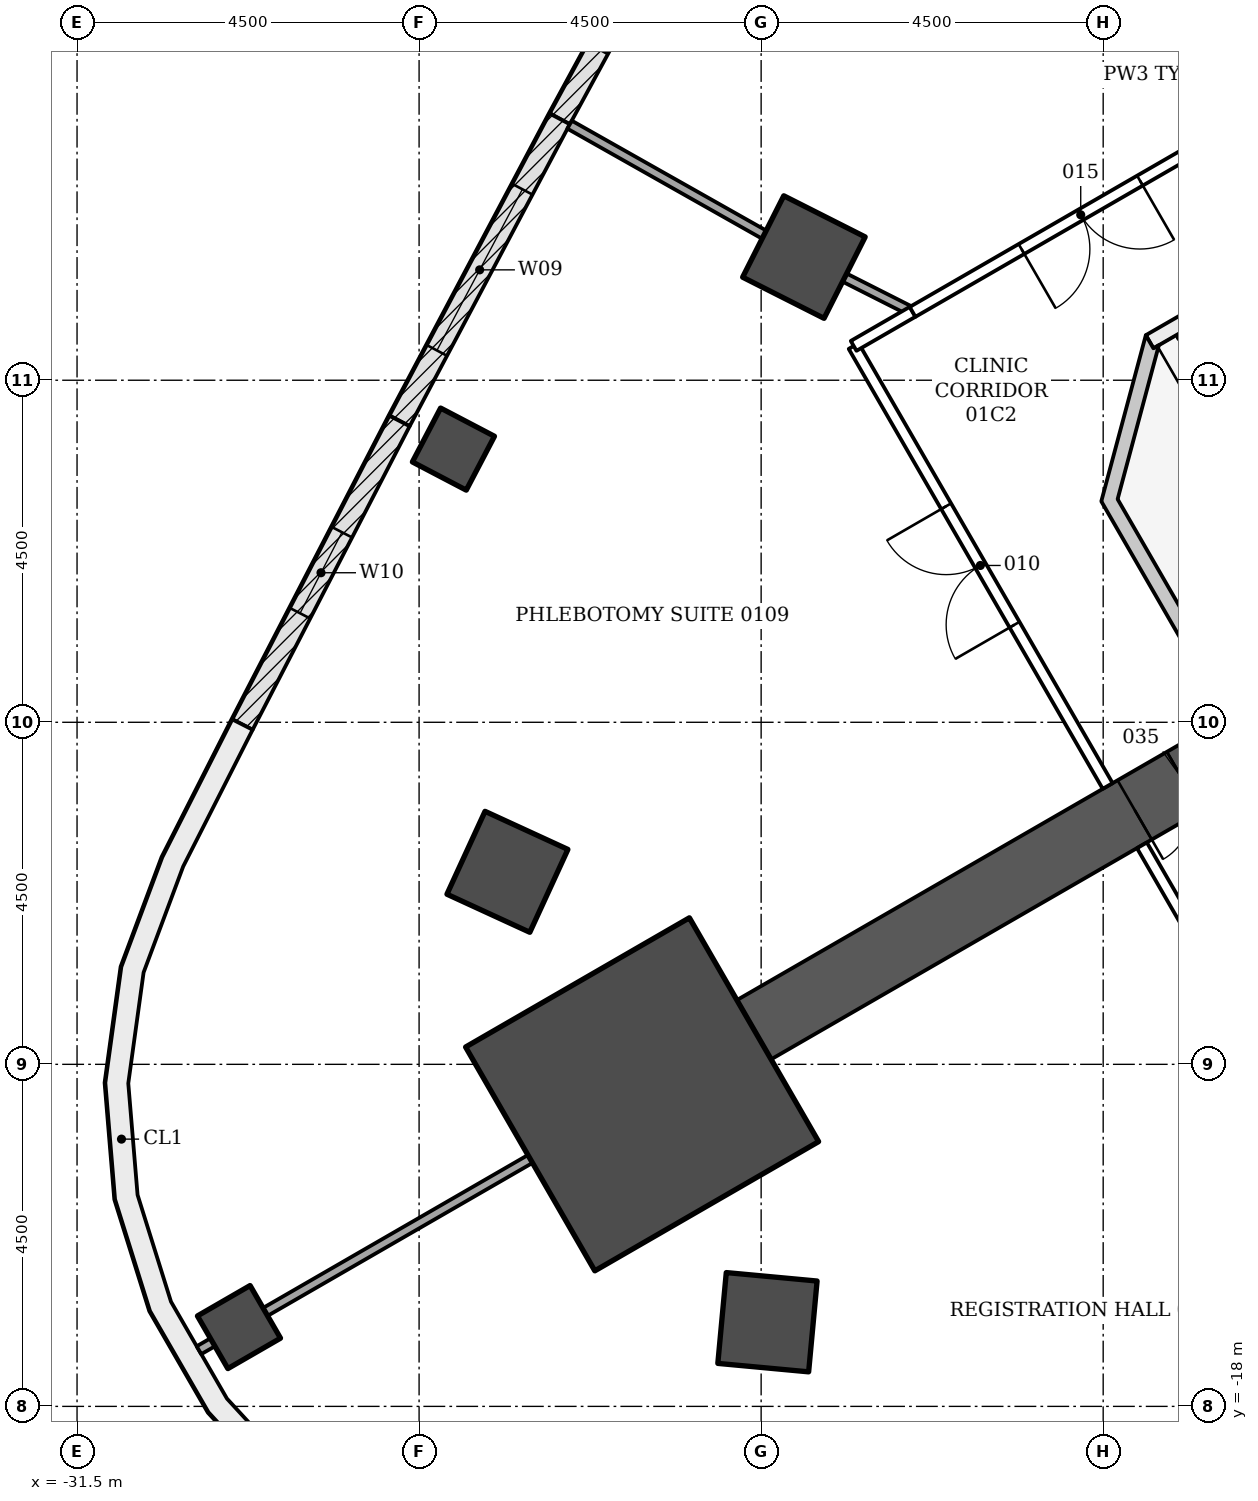
"""IFC4 building model, lengths in metres.
Left out: names, types, materials, properties, quantities, classifications, styles, units other than length and angle.
Written with IfcOpenShell. Run it as: python <this file> out.ifc"""

import sys

from ifc_helpers import new_model, si_unit, direction, frame, frame_2d, origin, origin_2d, place, context, subcontext, project, spatial, polyline, rectangle, outline, extrude, element, fill, save


model = new_model("IFC4")
c1 = context("Model", 3, precision=1e-05, world=origin(), true_north=direction((0.0, 1.0)))
c2 = subcontext(c1, "Body", "Model", "MODEL_VIEW")
j1 = project(units=[si_unit("LENGTHUNIT", "METRE"), si_unit("PLANEANGLEUNIT", "RADIAN")], contexts=[c1])
p1 = place(None, origin())
s1 = spatial("IfcSite", under=j1, at=p1, CompositionType="ELEMENT")
p2 = place(p1, origin())
s2 = spatial("IfcBuilding", under=s1, at=p2, CompositionType="ELEMENT")
p3 = place(p2, frame((0.0, 0.0, 6.0)))
s3 = spatial("IfcBuildingStorey", under=s2, at=p3, CompositionType="ELEMENT", Elevation=6.0)
for number, where, z_axis, x_axis in (
    (1, (-21.937, -2.88, -0.25), (0.0, 0.0, 1.0), (-0.893, 0.451, 0.0)),
    (2, (-25.838, -10.967, -0.25), (0.0, 0.0, 1.0), (-0.909, 0.418, 0.0)),
    (3, (-22.417, -16.893, -0.25), (0.0, 0.0, 1.0), (-0.093, -0.996, 0.0)),
):
    element("IfcColumn", number, at=place(p3, frame(where, z_axis=z_axis, x_axis=x_axis)), inside=s3, PredefinedType="COLUMN", context=c2, shape_type="SweptSolid", body=[
        extrude(rectangle(XDim=1.2, YDim=1.2, at=origin_2d()), origin(), (0.0, 0.0, 1.0), 4.5),
    ])
for number, where, z_axis, x_axis in (
    (4, (-26.548, -5.406, -0.25), (0.0, 0.0, 1.0), (-0.886, 0.464, 0.0)),
    (5, (-29.37, -16.957, -0.25), (0.0, 0.0, 1.0), (-0.866, -0.5, 0.0)),
):
    element("IfcColumn", number, at=place(p3, frame(where, z_axis=z_axis, x_axis=x_axis)), inside=s3, PredefinedType="COLUMN", context=c2, shape_type="SweptSolid", body=[
        extrude(rectangle(XDim=0.8, YDim=0.8, at=origin_2d()), origin(), (0.0, 0.0, 1.0), 4.5),
    ])
p4 = place(p3, frame((-9.922, -5.728, -0.25), z_axis=(0.0, 0.0, 1.0), x_axis=(-0.866028046028, -0.499995423472, 0.0)))
e6 = element("IfcWall", 6, at=p4, inside=s3, PredefinedType="SHEAR", context=c2, shape_type="SweptSolid", body=[
    extrude(rectangle(XDim=14.633, YDim=0.9, at=frame_2d((7.316, 0.0))), origin(), (0.0, 0.0, 1.0), 4.5),
])
p5 = place(p4, frame((7.35, 0.0, 0.25)))
e7 = element("IfcOpeningElement", 7, at=p5, cuts=e6, PredefinedType="OPENING", context=c2, shape_type="SweptSolid", body=[
    extrude(rectangle(XDim=1.5, YDim=2.1, at=frame_2d((0.75, 1.05))), frame((0.0, 0.46, 0.0), z_axis=(0.0, -1.0, 0.0), x_axis=(1.0, 0.0, 0.0)), (0.0, 0.0, 1.0), 0.92),
])
p6 = place(p3, frame((-24.066, -13.895, -0.25), z_axis=(0.0, 0.0, 1.0), x_axis=(-0.866025403784, -0.5, 0.0)))
e8 = element("IfcColumn", 8, at=p6, inside=s3, PredefinedType="COLUMN", context=c2, shape_type="SweptSolid", body=[
    extrude(rectangle(XDim=3.4, YDim=3.4, at=origin_2d()), origin(), (0.0, 0.0, 1.0), 4.5),
])
p7 = place(p3, frame((-25.148, -1.06, 0.0), z_axis=(0.0, 0.0, 1.0), x_axis=(0.477577109439, 0.878589838628, 0.0)))
e9 = element("IfcWall", 9, at=p7, inside=s3, PredefinedType="NOTDEFINED", context=c2, shape_type="SweptSolid", body=[
    extrude(rectangle(XDim=4.496, YDim=0.3, at=frame_2d((2.248, 0.0))), origin(), (0.0, 0.0, 1.0), 4.25),
])
p8 = place(p7, frame((1.048, 0.0, 0.9)))
e10 = element("IfcOpeningElement", 10, at=p8, cuts=e9, PredefinedType="OPENING", context=c2, shape_type="SweptSolid", body=[
    extrude(rectangle(XDim=2.4, YDim=2.4, at=frame_2d((1.2, 1.2))), frame((0.0, 0.16, 0.0), z_axis=(0.0, -1.0, 0.0), x_axis=(1.0, 0.0, 0.0)), (0.0, 0.0, 1.0), 0.32),
])
p9 = place(p3, frame((-27.256, -5.034, 0.0), z_axis=(0.0, 0.0, 1.0), x_axis=(0.468566202388, 0.883428386447, 0.0)))
e11 = element("IfcWall", 11, at=p9, inside=s3, PredefinedType="NOTDEFINED", context=c2, shape_type="SweptSolid", body=[
    extrude(rectangle(XDim=4.496, YDim=0.3, at=frame_2d((2.248, 0.0))), origin(), (0.0, 0.0, 1.0), 4.25),
])
p10 = place(p9, frame((1.048, 0.0, 0.9)))
e12 = element("IfcOpeningElement", 12, at=p10, cuts=e11, PredefinedType="OPENING", context=c2, shape_type="SweptSolid", body=[
    extrude(rectangle(XDim=2.4, YDim=2.4, at=frame_2d((1.2, 1.2))), frame((0.0, 0.16, 0.0), z_axis=(0.0, -1.0, 0.0), x_axis=(1.0, 0.0, 0.0)), (0.0, 0.0, 1.0), 0.32),
])
p11 = place(p3, frame((-29.323, -9.029, 0.0), z_axis=(0.0, 0.0, 1.0), x_axis=(0.459443600121, 0.888206945654, 0.0)))
e13 = element("IfcWall", 13, at=p11, inside=s3, PredefinedType="NOTDEFINED", context=c2, shape_type="SweptSolid", body=[
    extrude(rectangle(XDim=4.496, YDim=0.3, at=frame_2d((2.248, 0.0))), origin(), (0.0, 0.0, 1.0), 4.25),
])
p12 = place(p11, frame((1.648, 0.0, 0.8)))
e14 = element("IfcOpeningElement", 14, at=p12, cuts=e13, PredefinedType="OPENING", context=c2, shape_type="SweptSolid", body=[
    extrude(rectangle(XDim=1.2, YDim=3.0, at=frame_2d((0.6, 1.5))), frame((0.0, 0.16, 0.0), z_axis=(0.0, -1.0, 0.0), x_axis=(1.0, 0.0, 0.0)), (0.0, 0.0, 1.0), 0.32),
])
p13 = place(p3, origin())
e15 = element("IfcWall", 15, at=p13, inside=s3, PredefinedType="NOTDEFINED", context=c2, shape_type="SweptSolid", body=[
    extrude(outline(polyline([(-29.457, -8.962), (-30.379, -10.776), (-30.917, -12.218), (-31.128, -13.742), (-31.0, -15.276), (-30.54, -16.744), (-29.771, -18.077), (-28.729, -19.209), (-27.465, -20.086), (-26.04, -20.666), (-24.522, -20.921), (-22.49, -21.03), (-22.474, -20.73), (-24.489, -20.622), (-25.957, -20.376), (-27.321, -19.821), (-28.531, -18.981), (-29.528, -17.898), (-30.264, -16.623), (-30.704, -15.218), (-30.826, -13.75), (-30.625, -12.292), (-30.104, -10.897), (-29.19, -9.098), (-29.457, -8.962)])), origin(), (0.0, 0.0, 1.0), 4.25),
])
p14 = place(p3, frame((-12.539, -1.194, -0.25), z_axis=(0.0, 0.0, 1.0), x_axis=(-0.866045472092, -0.499965239061, 0.0)))
e16 = element("IfcWall", 16, at=p14, inside=s3, PredefinedType="SHEAR", context=c2, shape_type="SweptSolid", body=[
    extrude(rectangle(XDim=5.6, YDim=0.2, at=frame_2d((2.8, 0.0))), origin(), (0.0, 0.0, 1.0), 4.5),
])
p15 = place(p14, frame((0.45, 0.0, 0.25)))
e17 = element("IfcOpeningElement", 17, at=p15, cuts=e16, PredefinedType="OPENING", context=c2, shape_type="SweptSolid", body=[
    extrude(rectangle(XDim=1.2, YDim=2.1, at=frame_2d((0.6, 1.05))), frame((0.0, 0.11, 0.0), z_axis=(0.0, -1.0, 0.0), x_axis=(1.0, 0.0, 0.0)), (0.0, 0.0, 1.0), 0.22),
])
p16 = place(p3, frame((0.0, 0.0, -0.25)))
e18 = element("IfcWall", 18, at=p16, inside=s3, PredefinedType="SHEAR", context=c2, shape_type="SweptSolid", body=[
    extrude(outline(polyline([(-17.439, -3.907), (-18.025, -6.093), (-16.95, -7.955), (-16.777, -7.855), (-17.81, -6.065), (-17.267, -4.039), (-17.339, -4.081), (-17.339, -4.081), (-17.339, -4.081), (-17.339, -4.081), (-17.339, -4.081), (-17.339, -4.081), (-17.339, -4.081), (-17.339, -4.081), (-17.339, -4.081), (-17.339, -4.081), (-17.339, -4.081), (-17.339, -4.081), (-17.339, -4.081), (-17.339, -4.081), (-17.339, -4.081), (-17.339, -4.081), (-17.339, -4.081), (-17.439, -3.907)])), origin(), (0.0, 0.0, 1.0), 4.5),
])
p17 = place(p3, frame((-16.591, -12.176, 0.0), z_axis=(0.0, 0.0, 1.0), x_axis=(-0.499965372359, 0.866045395139, 0.0)))
e19 = element("IfcWall", 19, at=p17, inside=s3, PredefinedType="PARTITIONING", context=c2, shape_type="SweptSolid", body=[
    extrude(rectangle(XDim=1.798, YDim=0.15, at=frame_2d((0.899, 0.0))), origin(), (0.0, 0.0, 1.0), 3.638),
])
p18 = place(p3, frame((-29.716, -17.157, 0.0), z_axis=(0.0, 0.0, 1.0), x_axis=(-0.865774595023, -0.500434162116, 0.0)))
e20 = element("IfcWall", 20, at=p18, inside=s3, PredefinedType="PARTITIONING", context=c2, shape_type="SweptSolid", body=[
    extrude(rectangle(XDim=0.208, YDim=0.12, at=frame_2d((0.104, 0.0))), origin(), (0.0, 0.0, 1.0), 4.25),
])
p19 = place(p3, frame((-25.538, -14.745, 0.0), z_axis=(0.0, 0.0, 1.0), x_axis=(-0.866027971625, -0.499995552344, 0.0)))
e21 = element("IfcWall", 21, at=p19, inside=s3, PredefinedType="PARTITIONING", context=c2, shape_type="SweptSolid", body=[
    extrude(rectangle(XDim=4.024, YDim=0.12, at=frame_2d((2.012, 0.0))), origin(), (0.0, 0.0, 1.0), 3.717),
])
p20 = place(p3, frame((-17.941, -9.838, 0.0), z_axis=(0.0, 0.0, 1.0), x_axis=(-0.500048140185, 0.865997608252, 0.0)))
e22 = element("IfcWall", 22, at=p20, inside=s3, PredefinedType="PARTITIONING", context=c2, shape_type="SweptSolid", body=[
    extrude(rectangle(XDim=6.683, YDim=0.15, at=frame_2d((3.342, 0.0))), origin(), (0.0, 0.0, 1.0), 3.638),
])
p21 = place(p20, frame((2.45, 0.0, 0.0)))
e23 = element("IfcOpeningElement", 23, at=p21, cuts=e22, PredefinedType="OPENING", context=c2, shape_type="SweptSolid", body=[
    extrude(rectangle(XDim=1.8, YDim=2.1, at=frame_2d((0.9, 1.05))), frame((0.0, 0.085, 0.0), z_axis=(0.0, -1.0, 0.0), x_axis=(1.0, 0.0, 0.0)), (0.0, 0.0, 1.0), 0.17),
])
p22 = place(p3, frame((-21.283, -4.048, 0.0), z_axis=(0.0, 0.0, 1.0), x_axis=(0.865804825377, 0.500381858538, 0.0)))
e24 = element("IfcWall", 24, at=p22, inside=s3, PredefinedType="PARTITIONING", context=c2, shape_type="SweptSolid", body=[
    extrude(rectangle(XDim=0.897, YDim=0.15, at=frame_2d((0.449, 0.0))), origin(), (0.0, 0.0, 1.0), 3.638),
])
p23 = place(p3, frame((-22.461, -2.584, 0.0), z_axis=(0.0, 0.0, 1.0), x_axis=(-0.870620069476, 0.491955988505, 0.0)))
e25 = element("IfcWall", 25, at=p23, inside=s3, PredefinedType="PARTITIONING", context=c2, shape_type="SweptSolid", body=[
    extrude(rectangle(XDim=2.939, YDim=0.12, at=frame_2d((1.47, 0.0))), origin(), (0.0, 0.0, 1.0), 3.633),
])
p24 = place(p3, frame((-20.509, -3.601, 0.0), z_axis=(0.0, 0.0, 1.0), x_axis=(-0.892316605155, 0.451410097544, 0.0)))
e26 = element("IfcWall", 26, at=p24, inside=s3, PredefinedType="PARTITIONING", context=c2, shape_type="SweptSolid", body=[
    extrude(rectangle(XDim=1.0, YDim=0.12, at=frame_2d((0.5, 0.0))), origin(), (0.0, 0.0, 1.0), 3.638),
])
p25 = place(p3, frame((-16.087, -1.049, 0.0), z_axis=(0.0, 0.0, 1.0), x_axis=(-0.866071706002, -0.49991979363, 0.0)))
e27 = element("IfcWall", 27, at=p25, inside=s3, PredefinedType="PARTITIONING", context=c2, shape_type="SweptSolid", body=[
    extrude(rectangle(XDim=5.105, YDim=0.15, at=frame_2d((2.552, 0.0))), origin(), (0.0, 0.0, 1.0), 3.638),
])
p26 = place(p25, frame((1.65, 0.0, 0.0)))
e28 = element("IfcOpeningElement", 28, at=p26, cuts=e27, PredefinedType="OPENING", context=c2, shape_type="SweptSolid", body=[
    extrude(rectangle(XDim=1.8, YDim=2.1, at=frame_2d((0.9, 1.05))), frame((0.0, 0.085, 0.0), z_axis=(0.0, -1.0, 0.0), x_axis=(1.0, 0.0, 0.0)), (0.0, 0.0, 1.0), 0.17),
])
p27 = place(p10, origin())
e29 = element("IfcWindow", 29, at=p27, inside=s3, PartitioningType="DOUBLE_PANEL_VERTICAL", PredefinedType="WINDOW", context=c2, shape_type="SweptSolid", body=[
    extrude(rectangle(XDim=2.4, YDim=2.4, at=frame_2d((1.2, 1.2))), frame((0.0, 0.03, 0.0), z_axis=(0.0, -1.0, 0.0), x_axis=(1.0, 0.0, 0.0)), (0.0, 0.0, 1.0), 0.06),
])
fill(e12, e29)
p28 = place(p12, origin())
e30 = element("IfcWindow", 30, at=p28, inside=s3, PartitioningType="SINGLE_PANEL", PredefinedType="WINDOW", context=c2, shape_type="SweptSolid", body=[
    extrude(rectangle(XDim=1.2, YDim=3.0, at=frame_2d((0.6, 1.5))), frame((0.0, 0.03, 0.0), z_axis=(0.0, -1.0, 0.0), x_axis=(1.0, 0.0, 0.0)), (0.0, 0.0, 1.0), 0.06),
])
fill(e14, e30)
p29 = place(p21, origin())
e31 = element("IfcDoor", 31, at=p29, inside=s3, OperationType="DOUBLE_DOOR_SINGLE_SWING", PredefinedType="DOOR", context=c2, shape_type="SweptSolid", body=[
    extrude(rectangle(XDim=1.8, YDim=2.1, at=frame_2d((0.9, 1.05))), frame((0.0, 0.025, 0.0), z_axis=(0.0, -1.0, 0.0), x_axis=(1.0, 0.0, 0.0)), (0.0, 0.0, 1.0), 0.05),
])
fill(e23, e31)
p30 = place(p26, origin())
e32 = element("IfcDoor", 32, at=p30, inside=s3, OperationType="DOUBLE_DOOR_SINGLE_SWING", PredefinedType="DOOR", context=c2, shape_type="SweptSolid", body=[
    extrude(rectangle(XDim=1.8, YDim=2.1, at=frame_2d((0.9, 1.05))), frame((0.0, 0.025, 0.0), z_axis=(0.0, -1.0, 0.0), x_axis=(1.0, 0.0, 0.0)), (0.0, 0.0, 1.0), 0.05),
])
fill(e28, e32)
p31 = place(p5, origin())
e33 = element("IfcDoor", 33, at=p31, inside=s3, OperationType="DOUBLE_DOOR_SINGLE_SWING", PredefinedType="DOOR", context=c2, shape_type="SweptSolid", body=[
    extrude(rectangle(XDim=1.5, YDim=2.1, at=frame_2d((0.75, 1.05))), frame((0.0, 0.025, 0.0), z_axis=(0.0, -1.0, 0.0), x_axis=(1.0, 0.0, 0.0)), (0.0, 0.0, 1.0), 0.05),
])
fill(e7, e33)
save(model, sys.argv[1])
